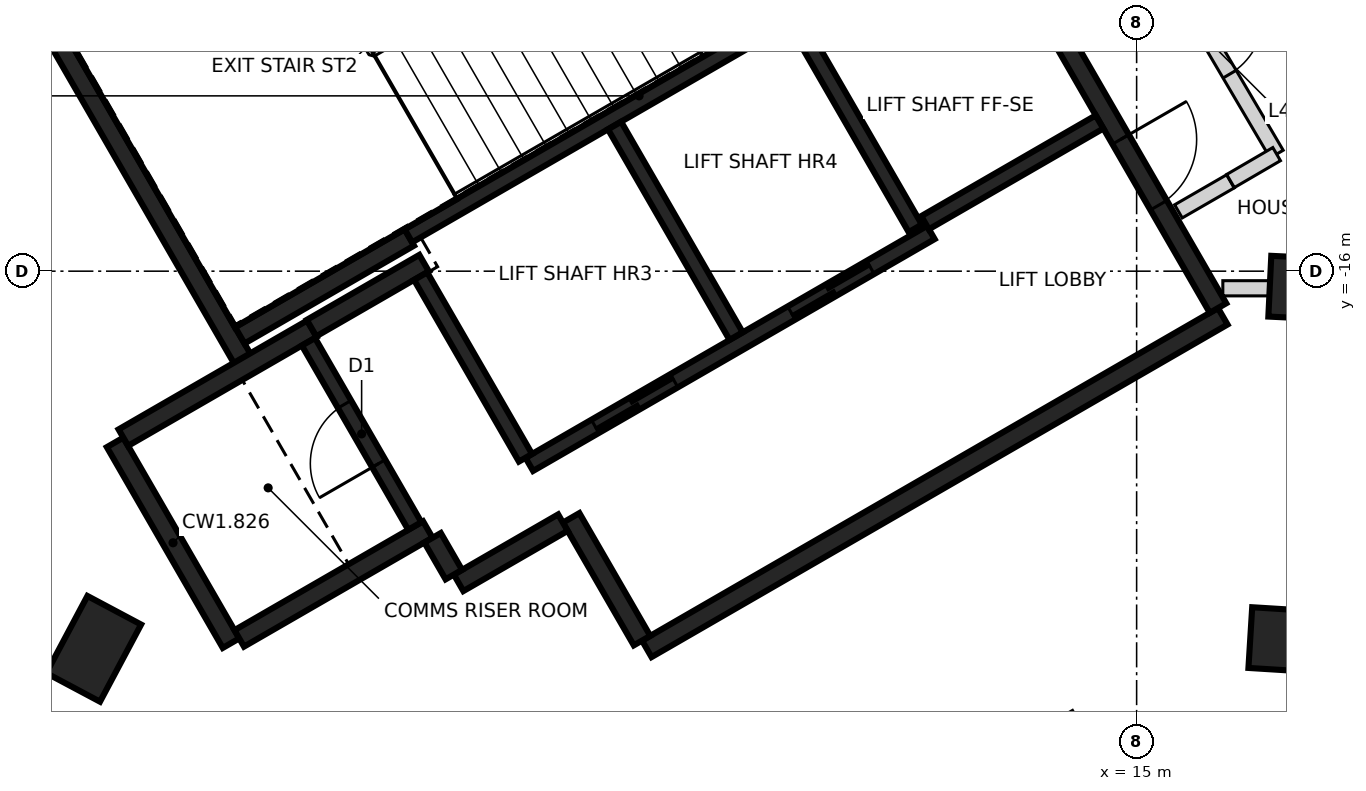
"""IFC4 building model, lengths in metres.
Left out: names, types, materials, properties, quantities, classifications, styles, units other than length and angle.
Written with IfcOpenShell. Run it as: python <this file> out.ifc"""

import sys

from ifc_helpers import new_model, si_unit, direction, frame, frame_2d, origin, origin_2d, place, context, subcontext, project, spatial, rectangle, extrude, element, fill, save


model = new_model("IFC4")
c1 = context("Model", 3, precision=1e-05, world=origin(), true_north=direction((0.0, 1.0)))
c2 = subcontext(c1, "Body", "Model", "MODEL_VIEW")
j1 = project(units=[si_unit("LENGTHUNIT", "METRE"), si_unit("PLANEANGLEUNIT", "RADIAN")], contexts=[c1])
p1 = place(None, origin())
s1 = spatial("IfcSite", under=j1, at=p1, CompositionType="ELEMENT")
p2 = place(p1, origin())
s2 = spatial("IfcBuilding", under=s1, at=p2, CompositionType="ELEMENT")
p3 = place(p2, frame((0.0, 0.0, 197.2)))
s3 = spatial("IfcBuildingStorey", under=s2, at=p3, CompositionType="ELEMENT", Elevation=197.2)
for number, where, z_axis, x_axis in (
    (1, (17.07, -20.856, -0.35), (0.0, 0.0, 1.0), (-0.998, 0.062, 0.0)),
    (2, (17.326, -16.226, -0.35), (0.0, 0.0, 1.0), (-0.999, 0.048, 0.0)),
    (3, (1.279, -20.968, -0.35), (0.0, 0.0, 1.0), (0.47, 0.883, 0.0)),
):
    element("IfcColumn", number, at=place(p3, frame(where, z_axis=z_axis, x_axis=x_axis)), inside=s3, PredefinedType="COLUMN", context=c2, shape_type="SweptSolid", body=[
        extrude(rectangle(XDim=1.15, YDim=0.8, at=origin_2d()), origin(), (0.0, 0.0, 1.0), 3.6),
    ])
p4 = place(p3, frame((16.133, -16.594, 0.0), z_axis=(0.0, 0.0, 1.0), x_axis=(-0.866022959057, -0.500004234368, 0.0)))
e4 = element("IfcWall", 4, at=p4, inside=s3, PredefinedType="SHEAR", context=c2, shape_type="SweptSolid", body=[
    extrude(rectangle(XDim=8.75, YDim=0.25, at=frame_2d((4.375, 0.0))), origin(), (0.0, 0.0, 1.0), 3.25),
])
p5 = place(p3, frame((13.008, -11.181, 0.0), z_axis=(0.0, 0.0, 1.0), x_axis=(0.500001955336, -0.866024274868, 0.0)))
e5 = element("IfcWall", 5, at=p5, inside=s3, PredefinedType="SHEAR", context=c2, shape_type="SweptSolid", body=[
    extrude(rectangle(XDim=6.125, YDim=0.25, at=frame_2d((3.062, 0.0))), origin(), (0.0, 0.0, 1.0), 3.25),
])
p6 = place(p5, frame((3.563, 0.0, 0.0)))
e6 = element("IfcOpeningElement", 6, at=p6, cuts=e5, PredefinedType="OPENING", context=c2, shape_type="SweptSolid", body=[
    extrude(rectangle(XDim=1.0, YDim=2.1, at=frame_2d((0.5, 1.05))), frame((0.0, 0.135, 0.0), z_axis=(0.0, -1.0, 0.0), x_axis=(1.0, 0.0, 0.0)), (0.0, 0.0, 1.0), 0.27),
])
p7 = place(p3, frame((3.235, -17.153, 0.0), z_axis=(0.0, 0.0, 1.0), x_axis=(-0.500008851346, 0.866020293397, 0.0)))
e7 = element("IfcWall", 7, at=p7, inside=s3, PredefinedType="SHEAR", context=c2, shape_type="SweptSolid", body=[
    extrude(rectangle(XDim=5.51, YDim=0.25, at=frame_2d((2.755, 0.0))), origin(), (0.0, 0.0, 1.0), 3.25),
])
p8 = place(p3, frame((3.085, -20.894, 0.0), z_axis=(0.0, 0.0, 1.0), x_axis=(-0.499978833458, 0.866037623948, 0.0)))
e8 = element("IfcWall", 8, at=p8, inside=s3, PredefinedType="SHEAR", context=c2, shape_type="SweptSolid", body=[
    extrude(rectangle(XDim=3.05, YDim=0.25, at=frame_2d((1.525, 0.0))), origin(), (0.0, 0.0, 1.0), 3.25),
])
p9 = place(p3, frame((1.669, -18.19, 0.0), z_axis=(0.0, 0.0, 1.0), x_axis=(0.866042235819, 0.499970844928, 0.0)))
e9 = element("IfcWall", 9, at=p9, inside=s3, PredefinedType="SHEAR", context=c2, shape_type="SweptSolid", body=[
    extrude(rectangle(XDim=2.865, YDim=0.25, at=frame_2d((1.432, 0.0))), origin(), (0.0, 0.0, 1.0), 3.25),
])
p10 = place(p3, frame((5.675, -19.399, 0.0), z_axis=(0.0, 0.0, 1.0), x_axis=(-0.866026637627, -0.499997862916, 0.0)))
e10 = element("IfcWall", 10, at=p10, inside=s3, PredefinedType="SHEAR", context=c2, shape_type="SweptSolid", body=[
    extrude(rectangle(XDim=2.865, YDim=0.25, at=frame_2d((1.432, 0.0))), origin(), (0.0, 0.0, 1.0), 3.25),
])
p11 = place(p3, frame((5.431, -15.556, 0.0), z_axis=(0.0, 0.0, 1.0), x_axis=(-0.866022940537, -0.500004266446, 0.0)))
e11 = element("IfcWall", 11, at=p11, inside=s3, PredefinedType="SHEAR", context=c2, shape_type="SweptSolid", body=[
    extrude(rectangle(XDim=2.575, YDim=0.25, at=frame_2d((1.287, 0.0))), origin(), (0.0, 0.0, 1.0), 3.25),
])
p12 = place(p3, frame((8.493, -20.86, 0.0), z_axis=(0.0, 0.0, 1.0), x_axis=(-0.500039802285, 0.866002422705, 0.0)))
e12 = element("IfcWall", 12, at=p12, inside=s3, PredefinedType="SHEAR", context=c2, shape_type="SweptSolid", body=[
    extrude(rectangle(XDim=1.865, YDim=0.25, at=frame_2d((0.932, 0.0))), origin(), (0.0, 0.0, 1.0), 3.25),
])
p13 = place(p3, frame((4.145, -16.749, 0.0), z_axis=(0.0, 0.0, 1.0), x_axis=(0.866038183914, 0.499977863513, 0.0)))
e13 = element("IfcWall", 13, at=p13, inside=s3, PredefinedType="SHEAR", context=c2, shape_type="SweptSolid", body=[
    extrude(rectangle(XDim=1.71, YDim=0.25, at=frame_2d((0.855, 0.0))), origin(), (0.0, 0.0, 1.0), 3.25),
])
p14 = place(p3, frame((7.452, -19.308, 0.0), z_axis=(0.0, 0.0, 1.0), x_axis=(-0.866044474677, -0.49996696679, 0.0)))
e14 = element("IfcWall", 14, at=p14, inside=s3, PredefinedType="SHEAR", context=c2, shape_type="SweptSolid", body=[
    extrude(rectangle(XDim=1.584, YDim=0.25, at=frame_2d((0.792, 0.0))), origin(), (0.0, 0.0, 1.0), 3.25),
])
p15 = place(p3, frame((6.017, -19.992, 0.0), z_axis=(0.0, 0.0, 1.0), x_axis=(-0.500364886717, 0.865814633822, 0.0)))
e15 = element("IfcWall", 15, at=p15, inside=s3, PredefinedType="SHEAR", context=c2, shape_type="SweptSolid", body=[
    extrude(rectangle(XDim=0.559, YDim=0.25, at=frame_2d((0.28, 0.0))), origin(), (0.0, 0.0, 1.0), 3.25),
])
p16 = place(p3, frame((5.419, -15.534, 0.0), z_axis=(0.0, 0.0, 1.0), x_axis=(0.866029065029, 0.499993658486, 0.0)))
e16 = element("IfcWall", 16, at=p16, inside=s3, PredefinedType="SHEAR", context=c2, shape_type="SweptSolid", body=[
    extrude(rectangle(XDim=5.974, YDim=0.2, at=frame_2d((2.987, 0.0))), origin(), (0.0, 0.0, 1.0), 3.25),
])
p17 = place(p3, frame((7.01, -18.542, 0.0), z_axis=(0.0, 0.0, 1.0), x_axis=(0.866030299012, 0.499991521122, 0.0)))
e17 = element("IfcWall", 17, at=p17, inside=s3, PredefinedType="SHEAR", context=c2, shape_type="SweptSolid", body=[
    extrude(rectangle(XDim=6.1, YDim=0.2, at=frame_2d((3.05, 0.0))), origin(), (0.0, 0.0, 1.0), 3.25),
])
p18 = place(p17, frame((1.0, 0.0, 0.0)))
e18 = element("IfcOpeningElement", 18, at=p18, cuts=e17, PredefinedType="OPENING", context=c2, shape_type="SweptSolid", body=[
    extrude(rectangle(XDim=1.2, YDim=2.1, at=frame_2d((0.6, 1.05))), frame((0.0, 0.11, 0.0), z_axis=(0.0, -1.0, 0.0), x_axis=(1.0, 0.0, 0.0)), (0.0, 0.0, 1.0), 0.22),
])
p19 = place(p17, frame((3.982, 0.0, 0.0)))
e19 = element("IfcOpeningElement", 19, at=p19, cuts=e17, PredefinedType="OPENING", context=c2, shape_type="SweptSolid", body=[
    extrude(rectangle(XDim=1.2, YDim=2.1, at=frame_2d((0.6, 1.05))), frame((0.0, 0.11, 0.0), z_axis=(0.0, -1.0, 0.0), x_axis=(1.0, 0.0, 0.0)), (0.0, 0.0, 1.0), 0.22),
])
p20 = place(p3, frame((8.132, -14.084, 0.0), z_axis=(0.0, 0.0, 1.0), x_axis=(0.499997778408, -0.866026686418, 0.0)))
e20 = element("IfcWall", 20, at=p20, inside=s3, PredefinedType="SHEAR", context=c2, shape_type="SweptSolid", body=[
    extrude(rectangle(XDim=3.198, YDim=0.2, at=frame_2d((1.599, 0.0))), origin(), (0.0, 0.0, 1.0), 3.25),
])
p21 = place(p3, frame((5.503, -19.352, 0.0), z_axis=(0.0, 0.0, 1.0), x_axis=(-0.499986818241, 0.866033014143, 0.0)))
e21 = element("IfcWall", 21, at=p21, inside=s3, PredefinedType="SHEAR", context=c2, shape_type="SweptSolid", body=[
    extrude(rectangle(XDim=2.798, YDim=0.2, at=frame_2d((1.399, 0.0))), origin(), (0.0, 0.0, 1.0), 3.25),
])
p22 = place(p21, frame((0.949, 0.0, 0.0)))
e22 = element("IfcOpeningElement", 22, at=p22, cuts=e21, PredefinedType="OPENING", context=c2, shape_type="SweptSolid", body=[
    extrude(rectangle(XDim=0.9, YDim=2.1, at=frame_2d((0.45, 1.05))), frame((0.0, 0.11, 0.0), z_axis=(0.0, -1.0, 0.0), x_axis=(1.0, 0.0, 0.0)), (0.0, 0.0, 1.0), 0.22),
])
p23 = place(p3, frame((6.96, -18.455, 0.0), z_axis=(0.0, 0.0, 1.0), x_axis=(-0.499926705758, 0.866067716099, 0.0)))
e23 = element("IfcWall", 23, at=p23, inside=s3, PredefinedType="SHEAR", context=c2, shape_type="SweptSolid", body=[
    extrude(rectangle(XDim=2.759, YDim=0.2, at=frame_2d((1.38, 0.0))), origin(), (0.0, 0.0, 1.0), 3.25),
])
p24 = place(p3, frame((12.088, -15.437, 0.0), z_axis=(0.0, 0.0, 1.0), x_axis=(-0.500026960575, 0.86600983753, 0.0)))
e24 = element("IfcWall", 24, at=p24, inside=s3, PredefinedType="SHEAR", context=c2, shape_type="SweptSolid", body=[
    extrude(rectangle(XDim=3.1, YDim=0.2, at=frame_2d((1.55, 0.0))), origin(), (0.0, 0.0, 1.0), 3.25),
])
p25 = place(p3, frame((14.512, -14.037, 0.0), z_axis=(0.0, 0.0, 1.0), x_axis=(-0.866018407898, -0.500012117035, 0.0)))
e25 = element("IfcWall", 25, at=p25, inside=s3, PredefinedType="SHEAR", context=c2, shape_type="SweptSolid", body=[
    extrude(rectangle(XDim=2.651, YDim=0.2, at=frame_2d((1.325, 0.0))), origin(), (0.0, 0.0, 1.0), 3.25),
])
p26 = place(p3, frame((11.573, -5.504, 0.0), z_axis=(0.0, 0.0, 1.0), x_axis=(0.507120747865, -0.861875018251, 0.0)))
e26 = element("IfcWall", 26, at=p26, inside=s3, PredefinedType="PARTITIONING", context=c2, shape_type="SweptSolid", body=[
    extrude(rectangle(XDim=10.391, YDim=0.2, at=frame_2d((5.196, 0.0))), origin(), (0.0, 0.0, 1.0), 3.25),
])
p27 = place(p26, frame((8.271, 0.0, 0.0)))
e27 = element("IfcOpeningElement", 27, at=p27, cuts=e26, PredefinedType="OPENING", context=c2, shape_type="SweptSolid", body=[
    extrude(rectangle(XDim=0.9, YDim=2.1, at=frame_2d((0.45, 1.05))), frame((0.0, 0.11, 0.0), z_axis=(0.0, -1.0, 0.0), x_axis=(1.0, 0.0, 0.0)), (0.0, 0.0, 1.0), 0.22),
])
p28 = place(p26, frame((4.321, 0.0, 0.0)))
e28 = element("IfcOpeningElement", 28, at=p28, cuts=e26, PredefinedType="OPENING", context=c2, shape_type="SweptSolid", body=[
    extrude(rectangle(XDim=0.95, YDim=2.1, at=frame_2d((0.475, 1.05))), frame((0.0, 0.11, 0.0), z_axis=(0.0, -1.0, 0.0), x_axis=(1.0, 0.0, 0.0)), (0.0, 0.0, 1.0), 0.22),
])
p29 = place(p3, frame((15.55, -15.213, 0.0), z_axis=(0.0, 0.0, 1.0), x_axis=(0.865989998118, 0.500061319399, 0.0)))
e29 = element("IfcWall", 29, at=p29, inside=s3, PredefinedType="PARTITIONING", context=c2, shape_type="SweptSolid", body=[
    extrude(rectangle(XDim=0.79, YDim=0.2, at=frame_2d((0.395, 0.0))), origin(), (0.0, 0.0, 1.0), 3.25),
])
p30 = place(p3, frame((16.235, -14.814, 0.0), z_axis=(0.0, 0.0, 1.0), x_axis=(0.863804104711, 0.503827816505, 0.0)))
e30 = element("IfcWall", 30, at=p30, inside=s3, PredefinedType="PARTITIONING", context=c2, shape_type="SweptSolid", body=[
    extrude(rectangle(XDim=0.703, YDim=0.2, at=frame_2d((0.351, 0.0))), origin(), (0.0, 0.0, 1.0), 3.25),
])
p31 = place(p3, frame((16.134, -16.225, 0.0), z_axis=(0.0, 0.0, 1.0), x_axis=(1.0, 0.0, 0.0)))
e31 = element("IfcWall", 31, at=p31, inside=s3, PredefinedType="PARTITIONING", context=c2, shape_type="SweptSolid", body=[
    extrude(rectangle(XDim=3.6, YDim=0.2, at=frame_2d((1.8, 0.0))), origin(), (0.0, 0.0, 1.0), 3.25),
])
p32 = place(p18, origin())
e32 = element("IfcDoor", 32, at=p32, inside=s3, OperationType="DOUBLE_DOOR_SLIDING", PredefinedType="DOOR", context=c2, shape_type="SweptSolid", body=[
    extrude(rectangle(XDim=1.2, YDim=2.1, at=frame_2d((0.6, 1.05))), frame((0.0, 0.025, 0.0), z_axis=(0.0, -1.0, 0.0), x_axis=(1.0, 0.0, 0.0)), (0.0, 0.0, 1.0), 0.05),
])
fill(e18, e32)
p33 = place(p19, origin())
e33 = element("IfcDoor", 33, at=p33, inside=s3, OperationType="DOUBLE_DOOR_SLIDING", PredefinedType="DOOR", context=c2, shape_type="SweptSolid", body=[
    extrude(rectangle(XDim=1.2, YDim=2.1, at=frame_2d((0.6, 1.05))), frame((0.0, 0.025, 0.0), z_axis=(0.0, -1.0, 0.0), x_axis=(1.0, 0.0, 0.0)), (0.0, 0.0, 1.0), 0.05),
])
fill(e19, e33)
p34 = place(p6, origin())
e34 = element("IfcDoor", 34, at=p34, inside=s3, OperationType="SINGLE_SWING_LEFT", PredefinedType="DOOR", context=c2, shape_type="SweptSolid", body=[
    extrude(rectangle(XDim=1.0, YDim=2.1, at=frame_2d((0.5, 1.05))), frame((0.0, 0.025, 0.0), z_axis=(0.0, -1.0, 0.0), x_axis=(1.0, 0.0, 0.0)), (0.0, 0.0, 1.0), 0.05),
])
fill(e6, e34)
p35 = place(p22, origin())
e35 = element("IfcDoor", 35, at=p35, inside=s3, OperationType="SINGLE_SWING_RIGHT", PredefinedType="DOOR", context=c2, shape_type="SweptSolid", body=[
    extrude(rectangle(XDim=0.9, YDim=2.1, at=frame_2d((0.45, 1.05))), frame((0.0, 0.025, 0.0), z_axis=(0.0, -1.0, 0.0), x_axis=(1.0, 0.0, 0.0)), (0.0, 0.0, 1.0), 0.05),
])
fill(e22, e35)
p36 = place(p27, origin())
e36 = element("IfcDoor", 36, at=p36, inside=s3, OperationType="SINGLE_SWING_LEFT", PredefinedType="DOOR", context=c2, shape_type="SweptSolid", body=[
    extrude(rectangle(XDim=0.9, YDim=2.1, at=frame_2d((0.45, 1.05))), frame((0.0, 0.025, 0.0), z_axis=(0.0, -1.0, 0.0), x_axis=(1.0, 0.0, 0.0)), (0.0, 0.0, 1.0), 0.05),
])
fill(e27, e36)
save(model, sys.argv[1])
